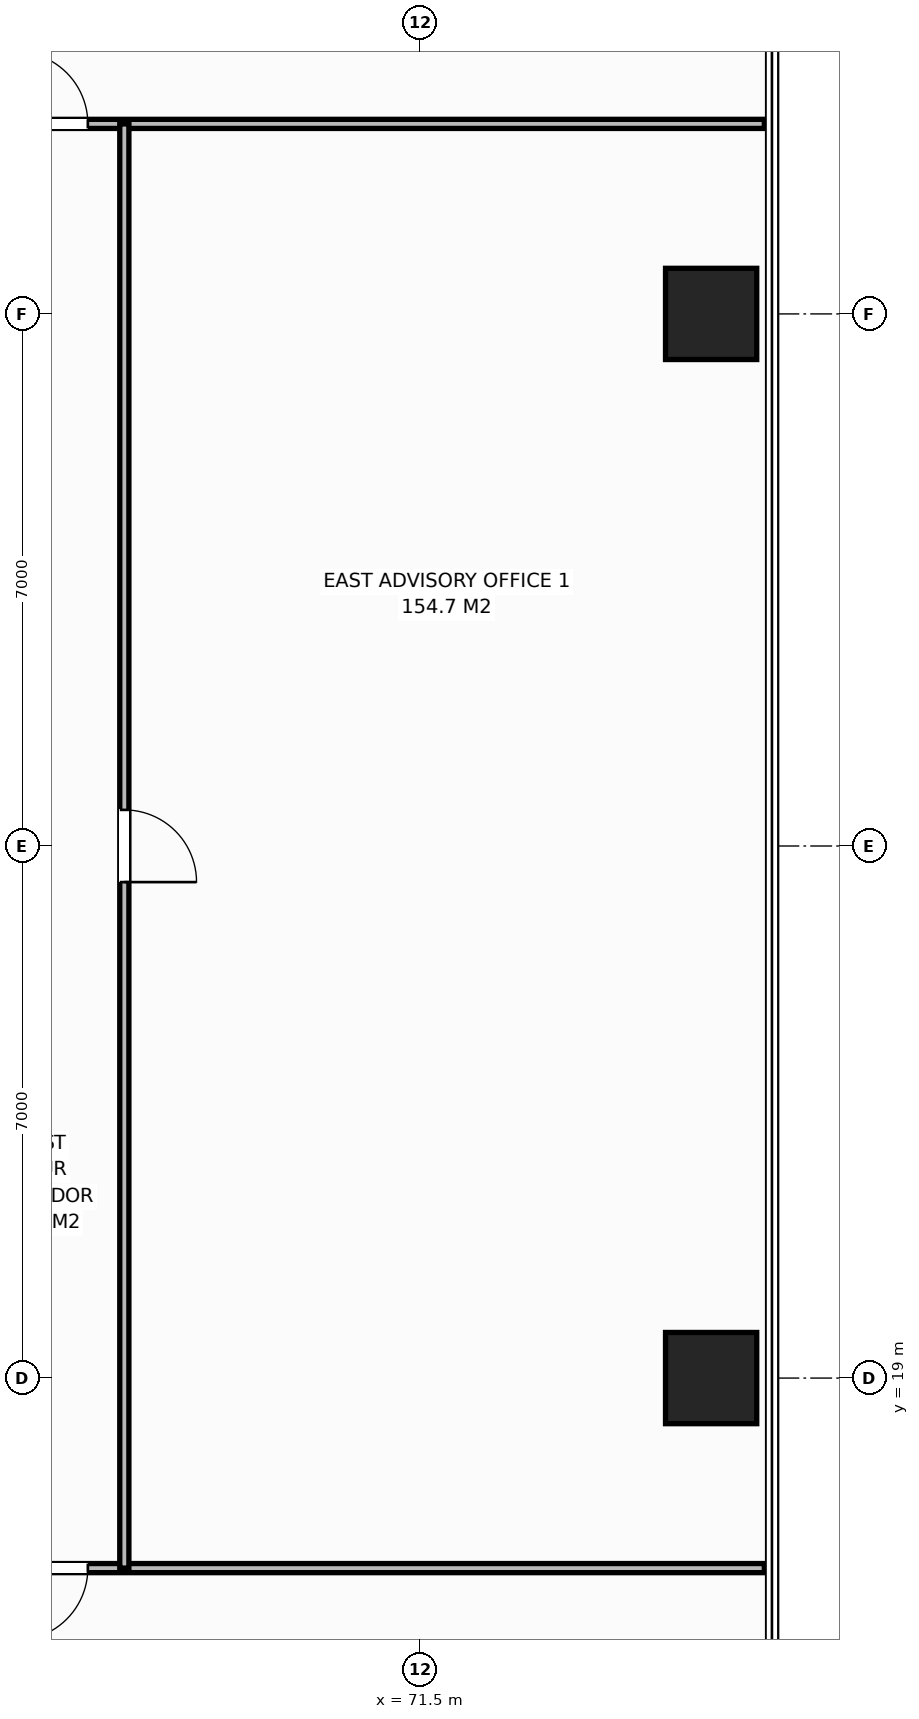
"""IFC4 building model, lengths in metres.
Left out: names, types, materials, properties, quantities, classifications, styles, units other than length and angle.
Written with IfcOpenShell. Run it as: python <this file> out.ifc"""

import sys

from ifc_helpers import new_model, si_unit, direction, frame, frame_2d, origin, origin_2d, place, context, subcontext, project, spatial, rectangle, extrude, element, fill, save


model = new_model("IFC4")
c1 = context("Model", 3, precision=1e-05, world=origin(), true_north=direction((0.0, 1.0)))
c2 = subcontext(c1, "Body", "Model", "MODEL_VIEW")
j1 = project(units=[si_unit("LENGTHUNIT", "METRE"), si_unit("PLANEANGLEUNIT", "RADIAN")], contexts=[c1])
p1 = place(None, origin())
s1 = spatial("IfcSite", under=j1, at=p1, CompositionType="ELEMENT")
p2 = place(p1, origin())
s2 = spatial("IfcBuilding", under=s1, at=p2, CompositionType="ELEMENT")
p3 = place(p2, frame((0.0, 0.0, 89.8)))
s3 = spatial("IfcBuildingStorey", under=s2, at=p3, CompositionType="ELEMENT", Elevation=89.8)
for number, where, z_axis, x_axis in (
    (1, (75.32, 19.0, 0.0), (0.0, 0.0, 1.0), (1.0, 0.0, 0.0)),
    (2, (75.32, 33.0, 0.0), (0.0, 0.0, 1.0), (1.0, 0.0, 0.0)),
):
    element("IfcColumn", number, at=place(p3, frame(where, z_axis=z_axis, x_axis=x_axis)), inside=s3, PredefinedType="COLUMN", context=c2, shape_type="SweptSolid", body=[
        extrude(rectangle(XDim=1.2, YDim=1.2, at=origin_2d()), origin(), (0.0, 0.0, 1.0), 3.8),
    ])
p4 = place(p3, frame((64.86, 35.5, 0.0), z_axis=(0.0, 0.0, 1.0), x_axis=(1.0, 0.0, 0.0)))
e3 = element("IfcWall", 3, at=p4, inside=s3, PredefinedType="PARTITIONING", context=c2, shape_type="SweptSolid", body=[
    extrude(rectangle(XDim=11.16, YDim=0.12, at=frame_2d((5.58, 0.0))), origin(), (0.0, 0.0, 1.0), 3.565),
])
p5 = place(p4, frame((1.31, 0.0, 0.0)))
e4 = element("IfcOpeningElement", 4, at=p5, cuts=e3, PredefinedType="OPENING", context=c2, shape_type="SweptSolid", body=[
    extrude(rectangle(XDim=0.95, YDim=2.15, at=frame_2d((0.475, 1.075))), frame((0.0, 0.07, 0.0), z_axis=(0.0, -1.0, 0.0), x_axis=(1.0, 0.0, 0.0)), (0.0, 0.0, 1.0), 0.14),
])
p6 = place(p3, frame((51.817, 16.5, 0.0), z_axis=(0.0, 0.0, 1.0), x_axis=(1.0, 0.0, 0.0)))
e5 = element("IfcWall", 5, at=p6, inside=s3, PredefinedType="PARTITIONING", context=c2, shape_type="SweptSolid", body=[
    extrude(rectangle(XDim=24.203, YDim=0.12, at=frame_2d((12.102, 0.0))), origin(), (0.0, 0.0, 1.0), 3.565),
])
p7 = place(p6, frame((14.353, 0.0, 0.0)))
e6 = element("IfcOpeningElement", 6, at=p7, cuts=e5, PredefinedType="OPENING", context=c2, shape_type="SweptSolid", body=[
    extrude(rectangle(XDim=0.95, YDim=2.15, at=frame_2d((0.475, 1.075))), frame((0.0, 0.07, 0.0), z_axis=(0.0, -1.0, 0.0), x_axis=(1.0, 0.0, 0.0)), (0.0, 0.0, 1.0), 0.14),
])
p8 = place(p3, frame((67.6, 16.5, 0.0), z_axis=(0.0, 0.0, 1.0), x_axis=(0.0, 1.0, 0.0)))
e7 = element("IfcWall", 7, at=p8, inside=s3, PredefinedType="PARTITIONING", context=c2, shape_type="SweptSolid", body=[
    extrude(rectangle(XDim=19.0, YDim=0.12, at=frame_2d((9.5, 0.0))), origin(), (0.0, 0.0, 1.0), 3.565),
])
p9 = place(p8, frame((9.025, 0.0, 0.0)))
e8 = element("IfcOpeningElement", 8, at=p9, cuts=e7, PredefinedType="OPENING", context=c2, shape_type="SweptSolid", body=[
    extrude(rectangle(XDim=0.95, YDim=2.15, at=frame_2d((0.475, 1.075))), frame((0.0, 0.07, 0.0), z_axis=(0.0, -1.0, 0.0), x_axis=(1.0, 0.0, 0.0)), (0.0, 0.0, 1.0), 0.14),
])
p10 = place(p5, origin())
e9 = element("IfcDoor", 9, at=p10, inside=s3, OperationType="SINGLE_SWING_LEFT", PredefinedType="DOOR", context=c2, shape_type="SweptSolid", body=[
    extrude(rectangle(XDim=0.95, YDim=2.15, at=frame_2d((0.475, 1.075))), frame((0.0, 0.025, 0.0), z_axis=(0.0, -1.0, 0.0), x_axis=(1.0, 0.0, 0.0)), (0.0, 0.0, 1.0), 0.05),
])
fill(e4, e9)
p11 = place(p7, origin())
e10 = element("IfcDoor", 10, at=p11, inside=s3, OperationType="SINGLE_SWING_RIGHT", PredefinedType="DOOR", context=c2, shape_type="SweptSolid", body=[
    extrude(rectangle(XDim=0.95, YDim=2.15, at=frame_2d((0.475, 1.075))), frame((0.0, 0.025, 0.0), z_axis=(0.0, -1.0, 0.0), x_axis=(1.0, 0.0, 0.0)), (0.0, 0.0, 1.0), 0.05),
])
fill(e6, e10)
p12 = place(p9, origin())
e11 = element("IfcDoor", 11, at=p12, inside=s3, OperationType="SINGLE_SWING_RIGHT", PredefinedType="DOOR", context=c2, shape_type="SweptSolid", body=[
    extrude(rectangle(XDim=0.95, YDim=2.15, at=frame_2d((0.475, 1.075))), frame((0.0, 0.025, 0.0), z_axis=(0.0, -1.0, 0.0), x_axis=(1.0, 0.0, 0.0)), (0.0, 0.0, 1.0), 0.05),
])
fill(e8, e11)
save(model, sys.argv[1])
